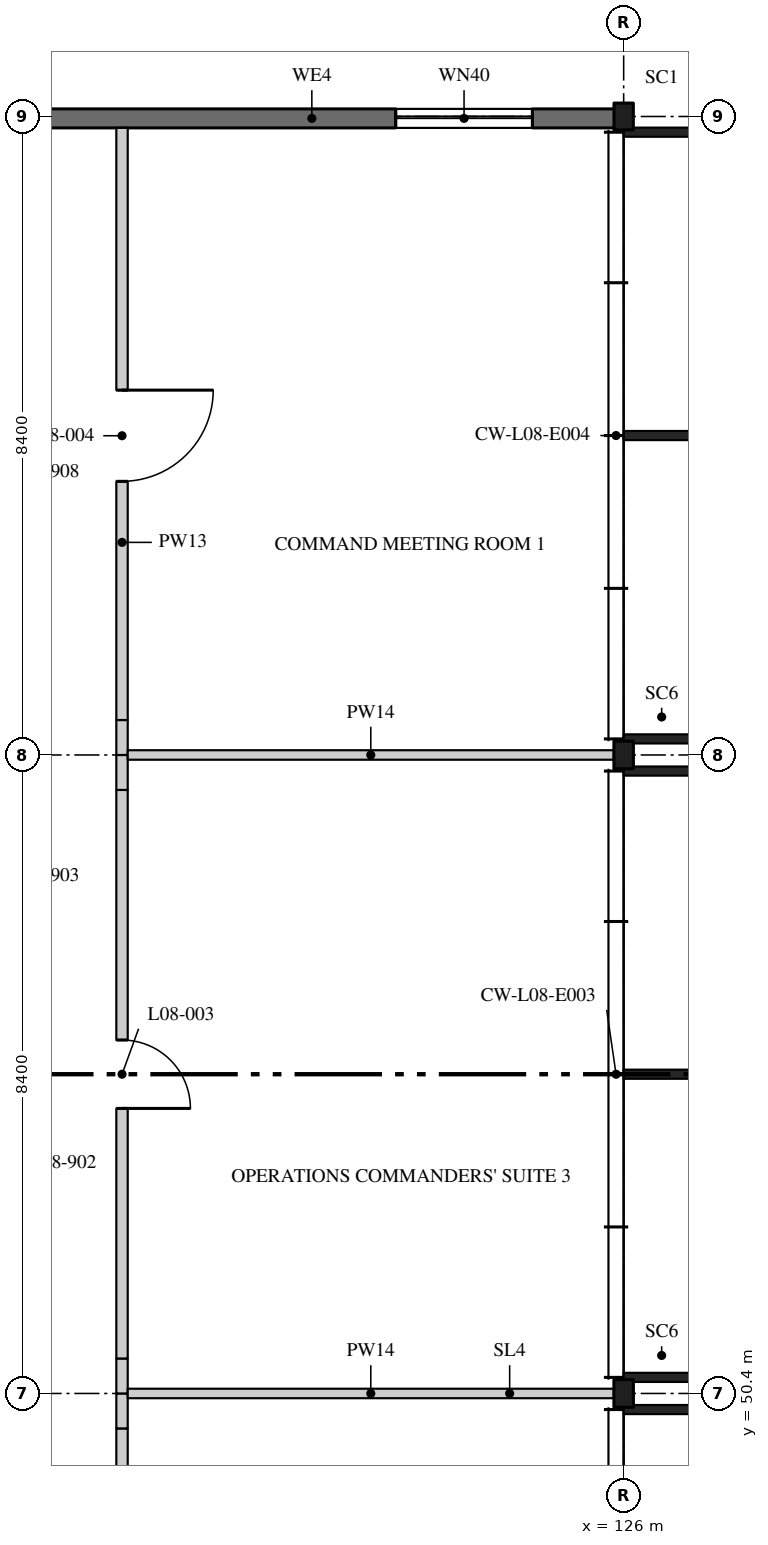
"""IFC4 building model, lengths in metres.
Left out: names, types, materials, properties, quantities, classifications, styles, units other than length and angle.
Written with IfcOpenShell. Run it as: python <this file> out.ifc"""

import sys

from ifc_helpers import new_model, si_unit, direction, frame, frame_2d, origin, origin_2d, place, context, subcontext, project, spatial, rectangle, i_section, extrude, element, fill, save


model = new_model("IFC4")
c1 = context("Model", 3, precision=1e-05, world=origin(), true_north=direction((0.0, 1.0)))
c2 = subcontext(c1, "Body", "Model", "MODEL_VIEW")
j1 = project(units=[si_unit("LENGTHUNIT", "METRE"), si_unit("PLANEANGLEUNIT", "RADIAN")], contexts=[c1])
p1 = place(None, origin())
s1 = spatial("IfcSite", under=j1, at=p1, CompositionType="ELEMENT")
p2 = place(p1, origin())
s2 = spatial("IfcBuilding", under=s1, at=p2, CompositionType="ELEMENT")
p3 = place(p2, frame((0.0, 0.0, 36.9)))
s3 = spatial("IfcBuildingStorey", under=s2, at=p3, CompositionType="ELEMENT", Elevation=36.9)
for number, where, z_axis, x_axis in (
    (1, (126.0, 50.4, 0.0), (0.0, 0.0, 1.0), (1.0, 0.0, 0.0)),
    (2, (126.0, 58.8, 0.0), (0.0, 0.0, 1.0), (1.0, 0.0, 0.0)),
):
    element("IfcColumn", number, at=place(p3, frame(where, z_axis=z_axis, x_axis=x_axis)), inside=s3, PredefinedType="COLUMN", context=c2, shape_type="SweptSolid", body=[
        extrude(i_section(OverallWidth=0.257, OverallDepth=0.363, WebThickness=0.013, FlangeThickness=0.022, FilletRadius=0.015, at=origin_2d()), origin(), (0.0, 0.0, 1.0), 4.37),
    ])
p4 = place(p3, frame((126.0, 67.2, 0.0), z_axis=(0.0, 0.0, 1.0), x_axis=(1.0, 0.0, 0.0)))
e3 = element("IfcColumn", 3, at=p4, inside=s3, PredefinedType="COLUMN", context=c2, shape_type="SweptSolid", body=[
    extrude(i_section(OverallWidth=0.254, OverallDepth=0.353, WebThickness=0.01, FlangeThickness=0.016, FilletRadius=0.015, at=origin_2d()), origin(), (0.0, 0.0, 1.0), 4.37),
])
p5 = place(p3, frame((119.4, 42.46, 0.0), z_axis=(0.0, 0.0, 1.0), x_axis=(0.0, 1.0, 0.0)))
e4 = element("IfcWall", 4, at=p5, inside=s3, PredefinedType="PARTITIONING", context=c2, shape_type="SweptSolid", body=[
    extrude(rectangle(XDim=7.48, YDim=0.15, at=frame_2d((3.74, 0.0))), origin(), (0.0, 0.0, 1.0), 4.37),
])
p6 = place(p5, frame((3.29, 0.0, 0.0)))
e5 = element("IfcOpeningElement", 5, at=p6, cuts=e4, PredefinedType="OPENING", context=c2, shape_type="SweptSolid", body=[
    extrude(rectangle(XDim=0.9, YDim=2.1, at=frame_2d((0.45, 1.05))), frame((0.0, 0.085, 0.0), z_axis=(0.0, -1.0, 0.0), x_axis=(1.0, 0.0, 0.0)), (0.0, 0.0, 1.0), 0.17),
])
p7 = place(p3, frame((119.4, 49.94, 0.0), z_axis=(0.0, 0.0, 1.0), x_axis=(0.0, 1.0, 0.0)))
e6 = element("IfcWall", 6, at=p7, inside=s3, PredefinedType="PARTITIONING", context=c2, shape_type="SweptSolid", body=[
    extrude(rectangle(XDim=0.46, YDim=0.15, at=frame_2d((0.23, 0.0))), origin(), (0.0, 0.0, 1.0), 3.817),
])
p8 = place(p3, frame((119.4, 50.4, 0.0), z_axis=(0.0, 0.0, 1.0), x_axis=(0.0, 1.0, 0.0)))
e7 = element("IfcWall", 7, at=p8, inside=s3, PredefinedType="PARTITIONING", context=c2, shape_type="SweptSolid", body=[
    extrude(rectangle(XDim=0.46, YDim=0.15, at=frame_2d((0.23, 0.0))), origin(), (0.0, 0.0, 1.0), 3.817),
])
p9 = place(p3, frame((119.4, 50.86, 0.0), z_axis=(0.0, 0.0, 1.0), x_axis=(0.0, 1.0, 0.0)))
e8 = element("IfcWall", 8, at=p9, inside=s3, PredefinedType="PARTITIONING", context=c2, shape_type="SweptSolid", body=[
    extrude(rectangle(XDim=7.48, YDim=0.15, at=frame_2d((3.74, 0.0))), origin(), (0.0, 0.0, 1.0), 4.37),
])
p10 = place(p9, frame((3.29, 0.0, 0.0)))
e9 = element("IfcOpeningElement", 9, at=p10, cuts=e8, PredefinedType="OPENING", context=c2, shape_type="SweptSolid", body=[
    extrude(rectangle(XDim=0.9, YDim=2.1, at=frame_2d((0.45, 1.05))), frame((0.0, 0.085, 0.0), z_axis=(0.0, -1.0, 0.0), x_axis=(1.0, 0.0, 0.0)), (0.0, 0.0, 1.0), 0.17),
])
for number, where, z_axis, x_axis in (
    (10, (119.4, 58.34, 0.0), (0.0, 0.0, 1.0), (0.0, 1.0, 0.0)),
    (11, (119.4, 58.8, 0.0), (0.0, 0.0, 1.0), (0.0, 1.0, 0.0)),
):
    element("IfcWall", number, at=place(p3, frame(where, z_axis=z_axis, x_axis=x_axis)), inside=s3, PredefinedType="PARTITIONING", context=c2, shape_type="SweptSolid", body=[
        extrude(rectangle(XDim=0.46, YDim=0.15, at=frame_2d((0.23, 0.0))), origin(), (0.0, 0.0, 1.0), 3.817),
    ])
p11 = place(p3, frame((119.4, 59.26, 0.0), z_axis=(0.0, 0.0, 1.0), x_axis=(0.0, 1.0, 0.0)))
e12 = element("IfcWall", 12, at=p11, inside=s3, PredefinedType="PARTITIONING", context=c2, shape_type="SweptSolid", body=[
    extrude(rectangle(XDim=7.79, YDim=0.15, at=frame_2d((3.895, 0.0))), origin(), (0.0, 0.0, 1.0), 4.37),
])
p12 = place(p11, frame((3.14, 0.0, 0.0)))
e13 = element("IfcOpeningElement", 13, at=p12, cuts=e12, PredefinedType="OPENING", context=c2, shape_type="SweptSolid", body=[
    extrude(rectangle(XDim=1.2, YDim=2.4, at=frame_2d((0.6, 1.2))), frame((0.0, 0.085, 0.0), z_axis=(0.0, -1.0, 0.0), x_axis=(1.0, 0.0, 0.0)), (0.0, 0.0, 1.0), 0.17),
])
for number, where, z_axis, x_axis in (
    (14, (119.475, 50.4, 0.0), (0.0, 0.0, 1.0), (1.0, 0.0, 0.0)),
    (15, (119.475, 58.8, 0.0), (0.0, 0.0, 1.0), (1.0, 0.0, 0.0)),
):
    element("IfcWall", number, at=place(p3, frame(where, z_axis=z_axis, x_axis=x_axis)), inside=s3, PredefinedType="PARTITIONING", context=c2, shape_type="SweptSolid", body=[
        extrude(rectangle(XDim=6.396, YDim=0.125, at=frame_2d((3.198, 0.0))), origin(), (0.0, 0.0, 1.0), 3.817),
    ])
p13 = place(p3, frame((125.995, 67.175, 0.0), z_axis=(0.0, 0.0, 1.0), x_axis=(-1.0, 0.0, 0.0)))
e16 = element("IfcWall", 16, at=p13, inside=s3, PredefinedType="SOLIDWALL", context=c2, shape_type="SweptSolid", body=[
    extrude(rectangle(XDim=8.195, YDim=0.25, at=frame_2d((4.097, 0.0))), origin(), (0.0, 0.0, 1.0), 3.819),
])
p14 = place(p13, frame((1.195, 0.0, 0.6)))
e17 = element("IfcOpeningElement", 17, at=p14, cuts=e16, PredefinedType="OPENING", context=c2, shape_type="SweptSolid", body=[
    extrude(rectangle(XDim=1.8, YDim=2.7, at=frame_2d((0.9, 1.35))), frame((0.0, 0.135, 0.0), z_axis=(0.0, -1.0, 0.0), x_axis=(1.0, 0.0, 0.0)), (0.0, 0.0, 1.0), 0.27),
])
p15 = place(p10, frame((0.9, 0.0, 0.0), z_axis=(0.0, 0.0, 1.0), x_axis=(-1.0, 0.0, 0.0)))
e18 = element("IfcDoor", 18, at=p15, inside=s3, OperationType="SINGLE_SWING_LEFT", PredefinedType="DOOR", context=c2, shape_type="SweptSolid", body=[
    extrude(rectangle(XDim=0.9, YDim=2.1, at=frame_2d((0.45, 1.05))), frame((0.0, 0.025, 0.0), z_axis=(0.0, -1.0, 0.0), x_axis=(1.0, 0.0, 0.0)), (0.0, 0.0, 1.0), 0.05),
])
fill(e9, e18)
p16 = place(p12, frame((1.2, 0.0, 0.0), z_axis=(0.0, 0.0, 1.0), x_axis=(-1.0, 0.0, 0.0)))
e19 = element("IfcDoor", 19, at=p16, inside=s3, OperationType="SINGLE_SWING_RIGHT", PredefinedType="DOOR", context=c2, shape_type="SweptSolid", body=[
    extrude(rectangle(XDim=1.2, YDim=2.4, at=frame_2d((0.6, 1.2))), frame((0.0, 0.025, 0.0), z_axis=(0.0, -1.0, 0.0), x_axis=(1.0, 0.0, 0.0)), (0.0, 0.0, 1.0), 0.05),
])
fill(e13, e19)
p17 = place(p14, origin())
e20 = element("IfcWindow", 20, at=p17, inside=s3, PartitioningType="SINGLE_PANEL", PredefinedType="WINDOW", context=c2, shape_type="SweptSolid", body=[
    extrude(rectangle(XDim=1.8, YDim=2.7, at=frame_2d((0.9, 1.35))), frame((0.0, 0.03, 0.0), z_axis=(0.0, -1.0, 0.0), x_axis=(1.0, 0.0, 0.0)), (0.0, 0.0, 1.0), 0.06),
])
fill(e17, e20)
save(model, sys.argv[1])
